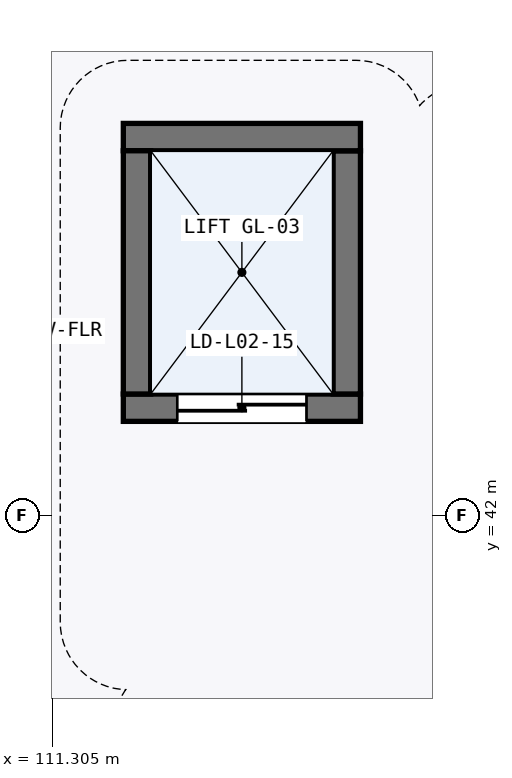
"""IFC4 building model, lengths in metres.
Left out: names, types, materials, properties, quantities, classifications, styles, units other than length and angle.
Written with IfcOpenShell. Run it as: python <this file> out.ifc"""

import sys

from ifc_helpers import new_model, si_unit, direction, frame, frame_2d, origin, place, context, subcontext, project, spatial, rectangle, extrude, element, fill, save


model = new_model("IFC4")
c1 = context("Model", 3, precision=1e-05, world=origin(), true_north=direction((0.0, 1.0)))
c2 = subcontext(c1, "Body", "Model", "MODEL_VIEW")
j1 = project(units=[si_unit("LENGTHUNIT", "METRE"), si_unit("PLANEANGLEUNIT", "RADIAN")], contexts=[c1])
p1 = place(None, origin())
s1 = spatial("IfcSite", under=j1, at=p1, CompositionType="ELEMENT")
p2 = place(p1, origin())
s2 = spatial("IfcBuilding", under=s1, at=p2, CompositionType="ELEMENT")
p3 = place(p2, frame((0.0, 0.0, 6.0)))
s3 = spatial("IfcBuildingStorey", under=s2, at=p3, CompositionType="ELEMENT", Elevation=6.0)
p4 = place(p3, frame((112.24, 43.42, 0.0), z_axis=(0.0, 0.0, 1.0), x_axis=(1.0, 0.0, 0.0)))
e1 = element("IfcWall", 1, at=p4, inside=s3, PredefinedType="SHEAR", context=c2, shape_type="SweptSolid", body=[
    extrude(rectangle(XDim=3.12, YDim=0.36, at=frame_2d((1.56, 0.0))), origin(), (0.0, 0.0, 1.0), 5.145),
])
p5 = place(p4, frame((0.71, 0.0, 0.0)))
e2 = element("IfcOpeningElement", 2, at=p5, cuts=e1, PredefinedType="OPENING", context=c2, shape_type="SweptSolid", body=[
    extrude(rectangle(XDim=1.7, YDim=2.3, at=frame_2d((0.85, 1.15))), frame((0.0, 0.19, 0.0), z_axis=(0.0, -1.0, 0.0), x_axis=(1.0, 0.0, 0.0)), (0.0, 0.0, 1.0), 0.38),
])
p6 = place(p3, frame((115.18, 43.6, 0.0), z_axis=(0.0, 0.0, 1.0), x_axis=(0.0, 1.0, 0.0)))
e3 = element("IfcWall", 3, at=p6, inside=s3, PredefinedType="SHEAR", context=c2, shape_type="SweptSolid", body=[
    extrude(rectangle(XDim=3.2, YDim=0.36, at=frame_2d((1.6, 0.0))), origin(), (0.0, 0.0, 1.0), 5.145),
])
p7 = place(p3, frame((115.36, 46.98, 0.0), z_axis=(0.0, 0.0, 1.0), x_axis=(-1.0, 0.0, 0.0)))
e4 = element("IfcWall", 4, at=p7, inside=s3, PredefinedType="SHEAR", context=c2, shape_type="SweptSolid", body=[
    extrude(rectangle(XDim=3.12, YDim=0.36, at=frame_2d((1.56, 0.0))), origin(), (0.0, 0.0, 1.0), 5.145),
])
p8 = place(p3, frame((112.42, 46.8, 0.0), z_axis=(0.0, 0.0, 1.0), x_axis=(0.0, -1.0, 0.0)))
e5 = element("IfcWall", 5, at=p8, inside=s3, PredefinedType="SHEAR", context=c2, shape_type="SweptSolid", body=[
    extrude(rectangle(XDim=3.2, YDim=0.36, at=frame_2d((1.6, 0.0))), origin(), (0.0, 0.0, 1.0), 5.145),
])
p9 = place(p5, frame((1.7, 0.0, 0.0), z_axis=(0.0, 0.0, 1.0), x_axis=(-1.0, 0.0, 0.0)))
e6 = element("IfcDoor", 6, at=p9, inside=s3, OperationType="DOUBLE_DOOR_SLIDING", PredefinedType="DOOR", context=c2, shape_type="SweptSolid", body=[
    extrude(rectangle(XDim=1.7, YDim=2.3, at=frame_2d((0.85, 1.15))), frame((0.0, 0.025, 0.0), z_axis=(0.0, -1.0, 0.0), x_axis=(1.0, 0.0, 0.0)), (0.0, 0.0, 1.0), 0.05),
])
fill(e2, e6)
save(model, sys.argv[1])
